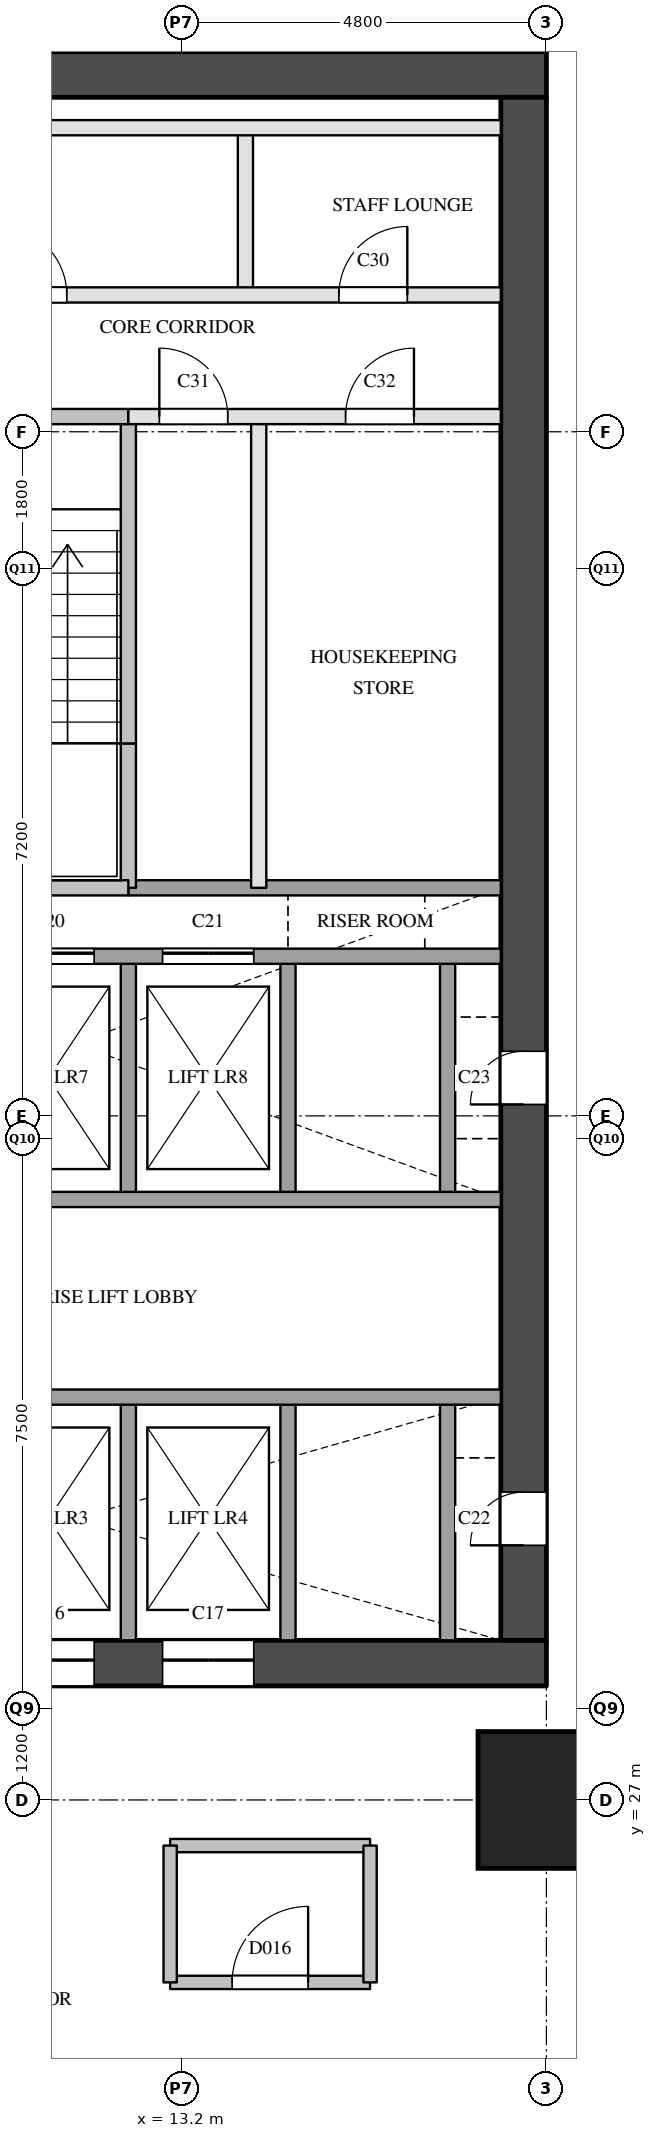
"""IFC4 building model, lengths in metres.
Left out: names, types, materials, properties, quantities, classifications, styles, units other than length and angle.
Written with IfcOpenShell. Run it as: python <this file> out.ifc"""

import sys

from ifc_helpers import new_model, si_unit, direction, frame, frame_2d, origin, origin_2d, place, context, subcontext, project, spatial, rectangle, extrude, element, fill, save


model = new_model("IFC4")
c1 = context("Model", 3, precision=1e-05, world=origin(), true_north=direction((0.0, 1.0)))
c2 = subcontext(c1, "Body", "Model", "MODEL_VIEW")
j1 = project(units=[si_unit("LENGTHUNIT", "METRE"), si_unit("PLANEANGLEUNIT", "RADIAN")], contexts=[c1])
p1 = place(None, origin())
s1 = spatial("IfcSite", under=j1, at=p1, CompositionType="ELEMENT")
p2 = place(p1, origin())
s2 = spatial("IfcBuilding", under=s1, at=p2, CompositionType="ELEMENT")
p3 = place(p2, frame((0.0, 0.0, 46.2)))
s3 = spatial("IfcBuildingStorey", under=s2, at=p3, CompositionType="ELEMENT", Elevation=46.2)
p4 = place(p3, frame((18.0, 27.0, 0.0), z_axis=(0.0, 0.0, 1.0), x_axis=(1.0, 0.0, 0.0)))
e1 = element("IfcColumn", 1, at=p4, inside=s3, PredefinedType="COLUMN", context=c2, shape_type="SweptSolid", body=[
    extrude(rectangle(XDim=1.8, YDim=1.8, at=origin_2d()), origin(), (0.0, 0.0, 1.0), 3.8),
])
p5 = place(p3, frame((5.6, 28.8, 0.0), z_axis=(0.0, 0.0, 1.0), x_axis=(1.0, 0.0, 0.0)))
e2 = element("IfcWall", 2, at=p5, inside=s3, PredefinedType="SHEAR", context=c2, shape_type="SweptSolid", body=[
    extrude(rectangle(XDim=12.4, YDim=0.6, at=frame_2d((6.2, 0.0))), origin(), (0.0, 0.0, 1.0), 3.5),
])
p6 = place(p5, frame((1.05, 0.0, 0.0)))
e3 = element("IfcOpeningElement", 3, at=p6, cuts=e2, PredefinedType="OPENING", context=c2, shape_type="SweptSolid", body=[
    extrude(rectangle(XDim=1.2, YDim=2.1, at=frame_2d((0.6, 1.05))), frame((0.0, 0.31, 0.0), z_axis=(0.0, -1.0, 0.0), x_axis=(1.0, 0.0, 0.0)), (0.0, 0.0, 1.0), 0.62),
])
p7 = place(p5, frame((5.25, 0.0, 0.0)))
e4 = element("IfcOpeningElement", 4, at=p7, cuts=e2, PredefinedType="OPENING", context=c2, shape_type="SweptSolid", body=[
    extrude(rectangle(XDim=1.2, YDim=2.1, at=frame_2d((0.6, 1.05))), frame((0.0, 0.31, 0.0), z_axis=(0.0, -1.0, 0.0), x_axis=(1.0, 0.0, 0.0)), (0.0, 0.0, 1.0), 0.62),
])
p8 = place(p5, frame((7.35, 0.0, 0.0)))
e5 = element("IfcOpeningElement", 5, at=p8, cuts=e2, PredefinedType="OPENING", context=c2, shape_type="SweptSolid", body=[
    extrude(rectangle(XDim=1.2, YDim=2.1, at=frame_2d((0.6, 1.05))), frame((0.0, 0.31, 0.0), z_axis=(0.0, -1.0, 0.0), x_axis=(1.0, 0.0, 0.0)), (0.0, 0.0, 1.0), 0.62),
])
p9 = place(p3, frame((5.6, 49.7, 0.0), z_axis=(0.0, 0.0, 1.0), x_axis=(1.0, 0.0, 0.0)))
e6 = element("IfcWall", 6, at=p9, inside=s3, PredefinedType="SHEAR", context=c2, shape_type="SweptSolid", body=[
    extrude(rectangle(XDim=12.4, YDim=0.6, at=frame_2d((6.2, 0.0))), origin(), (0.0, 0.0, 1.0), 3.5),
])
p10 = place(p3, frame((17.7, 29.1, 0.0), z_axis=(0.0, 0.0, 1.0), x_axis=(0.0, 1.0, 0.0)))
e7 = element("IfcWall", 7, at=p10, inside=s3, PredefinedType="SHEAR", context=c2, shape_type="SweptSolid", body=[
    extrude(rectangle(XDim=20.3, YDim=0.6, at=frame_2d((10.15, 0.0))), origin(), (0.0, 0.0, 1.0), 3.5),
])
p11 = place(p10, frame((1.25, 0.0, 0.0)))
e8 = element("IfcOpeningElement", 8, at=p11, cuts=e7, PredefinedType="OPENING", context=c2, shape_type="SweptSolid", body=[
    extrude(rectangle(XDim=0.7, YDim=2.1, at=frame_2d((0.35, 1.05))), frame((0.0, 0.31, 0.0), z_axis=(0.0, -1.0, 0.0), x_axis=(1.0, 0.0, 0.0)), (0.0, 0.0, 1.0), 0.62),
])
p12 = place(p10, frame((7.05, 0.0, 0.0)))
e9 = element("IfcOpeningElement", 9, at=p12, cuts=e7, PredefinedType="OPENING", context=c2, shape_type="SweptSolid", body=[
    extrude(rectangle(XDim=0.7, YDim=2.1, at=frame_2d((0.35, 1.05))), frame((0.0, 0.31, 0.0), z_axis=(0.0, -1.0, 0.0), x_axis=(1.0, 0.0, 0.0)), (0.0, 0.0, 1.0), 0.62),
])
p13 = place(p3, frame((12.5, 29.1, 0.0), z_axis=(0.0, 0.0, 1.0), x_axis=(0.0, 1.0, 0.0)))
e10 = element("IfcWall", 10, at=p13, inside=s3, PredefinedType="SOLIDWALL", context=c2, shape_type="SweptSolid", body=[
    extrude(rectangle(XDim=3.2, YDim=0.2, at=frame_2d((1.6, 0.0))), origin(), (0.0, 0.0, 1.0), 3.5),
])
p14 = place(p3, frame((12.5, 34.9, 0.0), z_axis=(0.0, 0.0, 1.0), x_axis=(0.0, 1.0, 0.0)))
e11 = element("IfcWall", 11, at=p14, inside=s3, PredefinedType="SOLIDWALL", context=c2, shape_type="SweptSolid", body=[
    extrude(rectangle(XDim=3.2, YDim=0.2, at=frame_2d((1.6, 0.0))), origin(), (0.0, 0.0, 1.0), 3.5),
])
p15 = place(p3, frame((12.5, 39.0, 0.0), z_axis=(0.0, 0.0, 1.0), x_axis=(0.0, 1.0, 0.0)))
e12 = element("IfcWall", 12, at=p15, inside=s3, PredefinedType="SOLIDWALL", context=c2, shape_type="SweptSolid", body=[
    extrude(rectangle(XDim=1.9, YDim=0.2, at=frame_2d((0.95, 0.0))), origin(), (0.0, 0.0, 1.0), 3.5),
])
p16 = place(p3, frame((12.5, 40.9, 0.0), z_axis=(0.0, 0.0, 1.0), x_axis=(0.0, 1.0, 0.0)))
e13 = element("IfcWall", 13, at=p16, inside=s3, PredefinedType="SOLIDWALL", context=c2, shape_type="SweptSolid", body=[
    extrude(rectangle(XDim=4.3, YDim=0.2, at=frame_2d((2.15, 0.0))), origin(), (0.0, 0.0, 1.0), 3.5),
])
p17 = place(p3, frame((14.04, 46.8, 0.0), z_axis=(0.0, 0.0, 1.0), x_axis=(0.0, 1.0, 0.0)))
e14 = element("IfcWall", 14, at=p17, inside=s3, PredefinedType="PARTITIONING", context=c2, shape_type="SweptSolid", body=[
    extrude(rectangle(XDim=2.2, YDim=0.2, at=frame_2d((1.1, 0.0))), origin(), (0.0, 0.0, 1.0), 3.5),
])
p18 = place(p3, frame((14.215, 39.0, 0.0), z_axis=(0.0, 0.0, 1.0), x_axis=(0.0, 1.0, 0.0)))
e15 = element("IfcWall", 15, at=p18, inside=s3, PredefinedType="PARTITIONING", context=c2, shape_type="SweptSolid", body=[
    extrude(rectangle(XDim=6.2, YDim=0.2, at=frame_2d((3.1, 0.0))), origin(), (0.0, 0.0, 1.0), 3.5),
])
p19 = place(p3, frame((14.6, 29.1, 0.0), z_axis=(0.0, 0.0, 1.0), x_axis=(0.0, 1.0, 0.0)))
e16 = element("IfcWall", 16, at=p19, inside=s3, PredefinedType="SOLIDWALL", context=c2, shape_type="SweptSolid", body=[
    extrude(rectangle(XDim=3.2, YDim=0.2, at=frame_2d((1.6, 0.0))), origin(), (0.0, 0.0, 1.0), 3.5),
])
p20 = place(p3, frame((14.6, 34.9, 0.0), z_axis=(0.0, 0.0, 1.0), x_axis=(0.0, 1.0, 0.0)))
e17 = element("IfcWall", 17, at=p20, inside=s3, PredefinedType="SOLIDWALL", context=c2, shape_type="SweptSolid", body=[
    extrude(rectangle(XDim=3.2, YDim=0.2, at=frame_2d((1.6, 0.0))), origin(), (0.0, 0.0, 1.0), 3.5),
])
p21 = place(p3, frame((16.7, 29.1, 0.0), z_axis=(0.0, 0.0, 1.0), x_axis=(0.0, 1.0, 0.0)))
e18 = element("IfcWall", 18, at=p21, inside=s3, PredefinedType="SOLIDWALL", context=c2, shape_type="SweptSolid", body=[
    extrude(rectangle(XDim=3.2, YDim=0.2, at=frame_2d((1.6, 0.0))), origin(), (0.0, 0.0, 1.0), 3.5),
])
p22 = place(p3, frame((16.7, 34.9, 0.0), z_axis=(0.0, 0.0, 1.0), x_axis=(0.0, 1.0, 0.0)))
e19 = element("IfcWall", 19, at=p22, inside=s3, PredefinedType="SOLIDWALL", context=c2, shape_type="SweptSolid", body=[
    extrude(rectangle(XDim=3.2, YDim=0.2, at=frame_2d((1.6, 0.0))), origin(), (0.0, 0.0, 1.0), 3.5),
])
p23 = place(p3, frame((6.2, 32.3, 0.0), z_axis=(0.0, 0.0, 1.0), x_axis=(1.0, 0.0, 0.0)))
e20 = element("IfcWall", 20, at=p23, inside=s3, PredefinedType="SOLIDWALL", context=c2, shape_type="SweptSolid", body=[
    extrude(rectangle(XDim=11.2, YDim=0.2, at=frame_2d((5.6, 0.0))), origin(), (0.0, 0.0, 1.0), 3.5),
])
p24 = place(p23, frame((2.55, 0.0, 0.0)))
e21 = element("IfcOpeningElement", 21, at=p24, cuts=e20, PredefinedType="OPENING", context=c2, shape_type="SweptSolid", body=[
    extrude(rectangle(XDim=1.2, YDim=2.1, at=frame_2d((0.6, 1.05))), frame((0.0, 0.11, 0.0), z_axis=(0.0, -1.0, 0.0), x_axis=(1.0, 0.0, 0.0)), (0.0, 0.0, 1.0), 0.22),
])
p25 = place(p3, frame((6.2, 34.9, 0.0), z_axis=(0.0, 0.0, 1.0), x_axis=(1.0, 0.0, 0.0)))
e22 = element("IfcWall", 22, at=p25, inside=s3, PredefinedType="SOLIDWALL", context=c2, shape_type="SweptSolid", body=[
    extrude(rectangle(XDim=11.2, YDim=0.2, at=frame_2d((5.6, 0.0))), origin(), (0.0, 0.0, 1.0), 3.5),
])
p26 = place(p3, frame((6.2, 38.1, 0.0), z_axis=(0.0, 0.0, 1.0), x_axis=(1.0, 0.0, 0.0)))
e23 = element("IfcWall", 23, at=p26, inside=s3, PredefinedType="SOLIDWALL", context=c2, shape_type="SweptSolid", body=[
    extrude(rectangle(XDim=11.2, YDim=0.2, at=frame_2d((5.6, 0.0))), origin(), (0.0, 0.0, 1.0), 3.5),
])
p27 = place(p26, frame((0.45, 0.0, 0.0)))
e24 = element("IfcOpeningElement", 24, at=p27, cuts=e23, PredefinedType="OPENING", context=c2, shape_type="SweptSolid", body=[
    extrude(rectangle(XDim=1.2, YDim=2.1, at=frame_2d((0.6, 1.05))), frame((0.0, 0.11, 0.0), z_axis=(0.0, -1.0, 0.0), x_axis=(1.0, 0.0, 0.0)), (0.0, 0.0, 1.0), 0.22),
])
p28 = place(p26, frame((2.55, 0.0, 0.0)))
e25 = element("IfcOpeningElement", 25, at=p28, cuts=e23, PredefinedType="OPENING", context=c2, shape_type="SweptSolid", body=[
    extrude(rectangle(XDim=1.2, YDim=2.1, at=frame_2d((0.6, 1.05))), frame((0.0, 0.11, 0.0), z_axis=(0.0, -1.0, 0.0), x_axis=(1.0, 0.0, 0.0)), (0.0, 0.0, 1.0), 0.22),
])
p29 = place(p26, frame((4.65, 0.0, 0.0)))
e26 = element("IfcOpeningElement", 26, at=p29, cuts=e23, PredefinedType="OPENING", context=c2, shape_type="SweptSolid", body=[
    extrude(rectangle(XDim=1.2, YDim=2.1, at=frame_2d((0.6, 1.05))), frame((0.0, 0.11, 0.0), z_axis=(0.0, -1.0, 0.0), x_axis=(1.0, 0.0, 0.0)), (0.0, 0.0, 1.0), 0.22),
])
p30 = place(p26, frame((6.75, 0.0, 0.0)))
e27 = element("IfcOpeningElement", 27, at=p30, cuts=e23, PredefinedType="OPENING", context=c2, shape_type="SweptSolid", body=[
    extrude(rectangle(XDim=1.2, YDim=2.1, at=frame_2d((0.6, 1.05))), frame((0.0, 0.11, 0.0), z_axis=(0.0, -1.0, 0.0), x_axis=(1.0, 0.0, 0.0)), (0.0, 0.0, 1.0), 0.22),
])
p31 = place(p3, frame((12.5, 39.0, 0.0), z_axis=(0.0, 0.0, 1.0), x_axis=(1.0, 0.0, 0.0)))
e28 = element("IfcWall", 28, at=p31, inside=s3, PredefinedType="SOLIDWALL", context=c2, shape_type="SweptSolid", body=[
    extrude(rectangle(XDim=4.9, YDim=0.2, at=frame_2d((2.45, 0.0))), origin(), (0.0, 0.0, 1.0), 3.5),
])
p32 = place(p3, frame((9.45, 39.0, 0.0), z_axis=(0.0, 0.0, 1.0), x_axis=(1.0, 0.0, 0.0)))
e29 = element("IfcWall", 29, at=p32, inside=s3, PredefinedType="SOLIDWALL", context=c2, shape_type="SweptSolid", body=[
    extrude(rectangle(XDim=3.05, YDim=0.2, at=frame_2d((1.525, 0.0))), origin(), (0.0, 0.0, 1.0), 3.5),
])
p33 = place(p3, frame((12.5, 45.2, 0.0), z_axis=(0.0, 0.0, 1.0), x_axis=(1.0, 0.0, 0.0)))
e30 = element("IfcWall", 30, at=p33, inside=s3, PredefinedType="PARTITIONING", context=c2, shape_type="SweptSolid", body=[
    extrude(rectangle(XDim=4.9, YDim=0.2, at=frame_2d((2.45, 0.0))), origin(), (0.0, 0.0, 1.0), 3.5),
])
p34 = place(p33, frame((0.407, 0.0, 0.0)))
e31 = element("IfcOpeningElement", 31, at=p34, cuts=e30, PredefinedType="OPENING", context=c2, shape_type="SweptSolid", body=[
    extrude(rectangle(XDim=0.9, YDim=2.1, at=frame_2d((0.45, 1.05))), frame((0.0, 0.11, 0.0), z_axis=(0.0, -1.0, 0.0), x_axis=(1.0, 0.0, 0.0)), (0.0, 0.0, 1.0), 0.22),
])
p35 = place(p33, frame((2.857, 0.0, 0.0)))
e32 = element("IfcOpeningElement", 32, at=p35, cuts=e30, PredefinedType="OPENING", context=c2, shape_type="SweptSolid", body=[
    extrude(rectangle(XDim=0.9, YDim=2.1, at=frame_2d((0.45, 1.05))), frame((0.0, 0.11, 0.0), z_axis=(0.0, -1.0, 0.0), x_axis=(1.0, 0.0, 0.0)), (0.0, 0.0, 1.0), 0.22),
])
p36 = place(p3, frame((6.2, 45.2, 0.0), z_axis=(0.0, 0.0, 1.0), x_axis=(1.0, 0.0, 0.0)))
e33 = element("IfcWall", 33, at=p36, inside=s3, PredefinedType="SOLIDWALL", context=c2, shape_type="SweptSolid", body=[
    extrude(rectangle(XDim=6.3, YDim=0.2, at=frame_2d((3.15, 0.0))), origin(), (0.0, 0.0, 1.0), 3.5),
])
p37 = place(p36, frame((1.025, 0.0, 0.0)))
e34 = element("IfcOpeningElement", 34, at=p37, cuts=e33, PredefinedType="OPENING", context=c2, shape_type="SweptSolid", body=[
    extrude(rectangle(XDim=1.1, YDim=2.1, at=frame_2d((0.55, 1.05))), frame((0.0, 0.11, 0.0), z_axis=(0.0, -1.0, 0.0), x_axis=(1.0, 0.0, 0.0)), (0.0, 0.0, 1.0), 0.22),
])
p38 = place(p36, frame((4.175, 0.0, 0.0)))
e35 = element("IfcOpeningElement", 35, at=p38, cuts=e33, PredefinedType="OPENING", context=c2, shape_type="SweptSolid", body=[
    extrude(rectangle(XDim=1.1, YDim=2.1, at=frame_2d((0.55, 1.05))), frame((0.0, 0.11, 0.0), z_axis=(0.0, -1.0, 0.0), x_axis=(1.0, 0.0, 0.0)), (0.0, 0.0, 1.0), 0.22),
])
p39 = place(p3, frame((6.2, 46.8, 0.0), z_axis=(0.0, 0.0, 1.0), x_axis=(1.0, 0.0, 0.0)))
e36 = element("IfcWall", 36, at=p39, inside=s3, PredefinedType="PARTITIONING", context=c2, shape_type="SweptSolid", body=[
    extrude(rectangle(XDim=11.2, YDim=0.2, at=frame_2d((5.6, 0.0))), origin(), (0.0, 0.0, 1.0), 3.5),
])
p40 = place(p39, frame((0.67, 0.0, 0.0)))
e37 = element("IfcOpeningElement", 37, at=p40, cuts=e36, PredefinedType="OPENING", context=c2, shape_type="SweptSolid", body=[
    extrude(rectangle(XDim=0.9, YDim=2.1, at=frame_2d((0.45, 1.05))), frame((0.0, 0.11, 0.0), z_axis=(0.0, -1.0, 0.0), x_axis=(1.0, 0.0, 0.0)), (0.0, 0.0, 1.0), 0.22),
])
p41 = place(p39, frame((4.59, 0.0, 0.0)))
e38 = element("IfcOpeningElement", 38, at=p41, cuts=e36, PredefinedType="OPENING", context=c2, shape_type="SweptSolid", body=[
    extrude(rectangle(XDim=0.9, YDim=2.1, at=frame_2d((0.45, 1.05))), frame((0.0, 0.11, 0.0), z_axis=(0.0, -1.0, 0.0), x_axis=(1.0, 0.0, 0.0)), (0.0, 0.0, 1.0), 0.22),
])
p42 = place(p39, frame((9.07, 0.0, 0.0)))
e39 = element("IfcOpeningElement", 39, at=p42, cuts=e36, PredefinedType="OPENING", context=c2, shape_type="SweptSolid", body=[
    extrude(rectangle(XDim=0.9, YDim=2.1, at=frame_2d((0.45, 1.05))), frame((0.0, 0.11, 0.0), z_axis=(0.0, -1.0, 0.0), x_axis=(1.0, 0.0, 0.0)), (0.0, 0.0, 1.0), 0.22),
])
p43 = place(p3, frame((6.2, 49.0, 0.0), z_axis=(0.0, 0.0, 1.0), x_axis=(1.0, 0.0, 0.0)))
e40 = element("IfcWall", 40, at=p43, inside=s3, PredefinedType="PARTITIONING", context=c2, shape_type="SweptSolid", body=[
    extrude(rectangle(XDim=11.2, YDim=0.2, at=frame_2d((5.6, 0.0))), origin(), (0.0, 0.0, 1.0), 3.5),
])
p44 = place(p3, frame((13.05, 24.6, 0.0), z_axis=(0.0, 0.0, 1.0), x_axis=(1.0, 0.0, 0.0)))
e41 = element("IfcWall", 41, at=p44, inside=s3, PredefinedType="PARTITIONING", context=c2, shape_type="SweptSolid", body=[
    extrude(rectangle(XDim=2.63, YDim=0.175, at=frame_2d((1.315, 0.0))), origin(), (0.0, 0.0, 1.0), 3.5),
])
p45 = place(p44, frame((0.815, 0.0, 0.0)))
e42 = element("IfcOpeningElement", 42, at=p45, cuts=e41, PredefinedType="OPENING", context=c2, shape_type="SweptSolid", body=[
    extrude(rectangle(XDim=1.0, YDim=2.1, at=frame_2d((0.5, 1.05))), frame((0.0, 0.097, 0.0), z_axis=(0.0, -1.0, 0.0), x_axis=(1.0, 0.0, 0.0)), (0.0, 0.0, 1.0), 0.195),
])
p46 = place(p3, frame((13.05, 26.4, 0.0), z_axis=(0.0, 0.0, 1.0), x_axis=(1.0, 0.0, 0.0)))
e43 = element("IfcWall", 43, at=p46, inside=s3, PredefinedType="PARTITIONING", context=c2, shape_type="SweptSolid", body=[
    extrude(rectangle(XDim=2.63, YDim=0.175, at=frame_2d((1.315, 0.0))), origin(), (0.0, 0.0, 1.0), 3.5),
])
for number, where, z_axis, x_axis in (
    (44, (13.05, 24.6, 0.0), (0.0, 0.0, 1.0), (0.0, 1.0, 0.0)),
    (45, (15.68, 24.6, 0.0), (0.0, 0.0, 1.0), (0.0, 1.0, 0.0)),
):
    element("IfcWall", number, at=place(p3, frame(where, z_axis=z_axis, x_axis=x_axis)), inside=s3, PredefinedType="PARTITIONING", context=c2, shape_type="SweptSolid", body=[
        extrude(rectangle(XDim=1.8, YDim=0.175, at=frame_2d((0.9, 0.0))), origin(), (0.0, 0.0, 1.0), 3.5),
    ])
p47 = place(p7, origin())
e46 = element("IfcDoor", 46, at=p47, inside=s3, OperationType="SLIDING_TO_LEFT", PredefinedType="DOOR", context=c2, shape_type="SweptSolid", body=[
    extrude(rectangle(XDim=1.2, YDim=2.1, at=frame_2d((0.6, 1.05))), frame((0.0, 0.025, 0.0), z_axis=(0.0, -1.0, 0.0), x_axis=(1.0, 0.0, 0.0)), (0.0, 0.0, 1.0), 0.05),
])
fill(e4, e46)
p48 = place(p8, origin())
e47 = element("IfcDoor", 47, at=p48, inside=s3, OperationType="SLIDING_TO_LEFT", PredefinedType="DOOR", context=c2, shape_type="SweptSolid", body=[
    extrude(rectangle(XDim=1.2, YDim=2.1, at=frame_2d((0.6, 1.05))), frame((0.0, 0.025, 0.0), z_axis=(0.0, -1.0, 0.0), x_axis=(1.0, 0.0, 0.0)), (0.0, 0.0, 1.0), 0.05),
])
fill(e5, e47)
p49 = place(p29, origin())
e48 = element("IfcDoor", 48, at=p49, inside=s3, OperationType="SLIDING_TO_LEFT", PredefinedType="DOOR", context=c2, shape_type="SweptSolid", body=[
    extrude(rectangle(XDim=1.2, YDim=2.1, at=frame_2d((0.6, 1.05))), frame((0.0, 0.025, 0.0), z_axis=(0.0, -1.0, 0.0), x_axis=(1.0, 0.0, 0.0)), (0.0, 0.0, 1.0), 0.05),
])
fill(e26, e48)
p50 = place(p30, origin())
e49 = element("IfcDoor", 49, at=p50, inside=s3, OperationType="SLIDING_TO_LEFT", PredefinedType="DOOR", context=c2, shape_type="SweptSolid", body=[
    extrude(rectangle(XDim=1.2, YDim=2.1, at=frame_2d((0.6, 1.05))), frame((0.0, 0.025, 0.0), z_axis=(0.0, -1.0, 0.0), x_axis=(1.0, 0.0, 0.0)), (0.0, 0.0, 1.0), 0.05),
])
fill(e27, e49)
p51 = place(p11, origin())
e50 = element("IfcDoor", 50, at=p51, inside=s3, OperationType="SINGLE_SWING_LEFT", PredefinedType="DOOR", context=c2, shape_type="SweptSolid", body=[
    extrude(rectangle(XDim=0.7, YDim=2.1, at=frame_2d((0.35, 1.05))), frame((0.0, 0.025, 0.0), z_axis=(0.0, -1.0, 0.0), x_axis=(1.0, 0.0, 0.0)), (0.0, 0.0, 1.0), 0.05),
])
fill(e8, e50)
p52 = place(p12, origin())
e51 = element("IfcDoor", 51, at=p52, inside=s3, OperationType="SINGLE_SWING_LEFT", PredefinedType="DOOR", context=c2, shape_type="SweptSolid", body=[
    extrude(rectangle(XDim=0.7, YDim=2.1, at=frame_2d((0.35, 1.05))), frame((0.0, 0.025, 0.0), z_axis=(0.0, -1.0, 0.0), x_axis=(1.0, 0.0, 0.0)), (0.0, 0.0, 1.0), 0.05),
])
fill(e9, e51)
p53 = place(p41, origin())
e52 = element("IfcDoor", 52, at=p53, inside=s3, OperationType="SINGLE_SWING_LEFT", PredefinedType="DOOR", context=c2, shape_type="SweptSolid", body=[
    extrude(rectangle(XDim=0.9, YDim=2.1, at=frame_2d((0.45, 1.05))), frame((0.0, 0.025, 0.0), z_axis=(0.0, -1.0, 0.0), x_axis=(1.0, 0.0, 0.0)), (0.0, 0.0, 1.0), 0.05),
])
fill(e38, e52)
p54 = place(p42, origin())
e53 = element("IfcDoor", 53, at=p54, inside=s3, OperationType="SINGLE_SWING_RIGHT", PredefinedType="DOOR", context=c2, shape_type="SweptSolid", body=[
    extrude(rectangle(XDim=0.9, YDim=2.1, at=frame_2d((0.45, 1.05))), frame((0.0, 0.025, 0.0), z_axis=(0.0, -1.0, 0.0), x_axis=(1.0, 0.0, 0.0)), (0.0, 0.0, 1.0), 0.05),
])
fill(e39, e53)
p55 = place(p34, origin())
e54 = element("IfcDoor", 54, at=p55, inside=s3, OperationType="SINGLE_SWING_LEFT", PredefinedType="DOOR", context=c2, shape_type="SweptSolid", body=[
    extrude(rectangle(XDim=0.9, YDim=2.1, at=frame_2d((0.45, 1.05))), frame((0.0, 0.025, 0.0), z_axis=(0.0, -1.0, 0.0), x_axis=(1.0, 0.0, 0.0)), (0.0, 0.0, 1.0), 0.05),
])
fill(e31, e54)
p56 = place(p35, origin())
e55 = element("IfcDoor", 55, at=p56, inside=s3, OperationType="SINGLE_SWING_RIGHT", PredefinedType="DOOR", context=c2, shape_type="SweptSolid", body=[
    extrude(rectangle(XDim=0.9, YDim=2.1, at=frame_2d((0.45, 1.05))), frame((0.0, 0.025, 0.0), z_axis=(0.0, -1.0, 0.0), x_axis=(1.0, 0.0, 0.0)), (0.0, 0.0, 1.0), 0.05),
])
fill(e32, e55)
p57 = place(p45, origin())
e56 = element("IfcDoor", 56, at=p57, inside=s3, OperationType="SINGLE_SWING_RIGHT", PredefinedType="DOOR", context=c2, shape_type="SweptSolid", body=[
    extrude(rectangle(XDim=1.0, YDim=2.1, at=frame_2d((0.5, 1.05))), frame((0.0, 0.025, 0.0), z_axis=(0.0, -1.0, 0.0), x_axis=(1.0, 0.0, 0.0)), (0.0, 0.0, 1.0), 0.05),
])
fill(e42, e56)
save(model, sys.argv[1])
